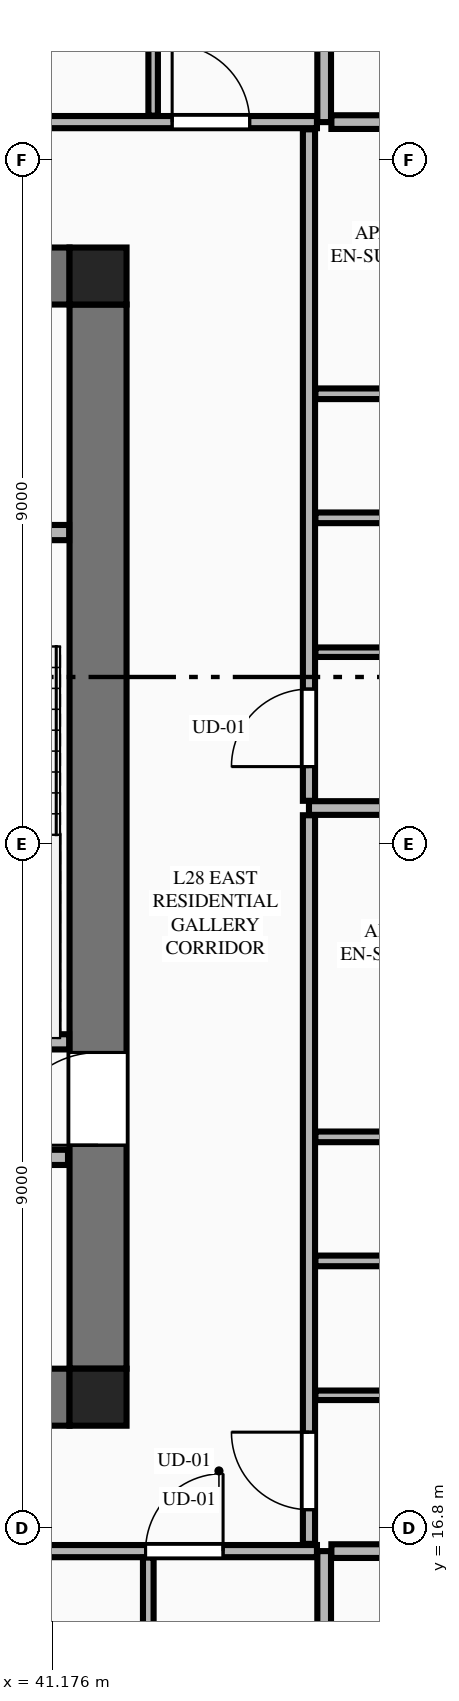
"""IFC4 building model, lengths in metres.
Left out: names, types, materials, properties, quantities, classifications, styles, units other than length and angle.
Written with IfcOpenShell. Run it as: python <this file> out.ifc"""

import sys

from ifc_helpers import new_model, si_unit, direction, frame, frame_2d, origin, origin_2d, place, context, subcontext, project, spatial, rectangle, extrude, element, fill, save


model = new_model("IFC4")
c1 = context("Model", 3, precision=1e-05, world=origin(), true_north=direction((0.0, 1.0)))
c2 = subcontext(c1, "Body", "Model", "MODEL_VIEW")
j1 = project(units=[si_unit("LENGTHUNIT", "METRE"), si_unit("PLANEANGLEUNIT", "RADIAN")], contexts=[c1])
p1 = place(None, origin())
s1 = spatial("IfcSite", under=j1, at=p1, CompositionType="ELEMENT")
p2 = place(p1, origin())
s2 = spatial("IfcBuilding", under=s1, at=p2, CompositionType="ELEMENT")
p3 = place(p2, frame((0.0, 0.0, 109.05)))
s3 = spatial("IfcBuildingStorey", under=s2, at=p3, CompositionType="ELEMENT", Elevation=109.05)
for number, where, z_axis, x_axis in (
    (1, (41.775, 18.525, 0.0), (0.0, 0.0, 1.0), (1.0, 0.0, 0.0)),
    (2, (41.775, 33.275, 0.0), (0.0, 0.0, 1.0), (1.0, 0.0, 0.0)),
):
    element("IfcColumn", number, at=place(p3, frame(where, z_axis=z_axis, x_axis=x_axis)), inside=s3, PredefinedType="COLUMN", context=c2, shape_type="SweptSolid", body=[
        extrude(rectangle(XDim=0.75, YDim=0.75, at=origin_2d()), origin(), (0.0, 0.0, 1.0), 3.55),
    ])
for number, where, z_axis, x_axis in (
    (3, (23.4, 18.525, 0.0), (0.0, 0.0, 1.0), (1.0, 0.0, 0.0)),
    (4, (23.4, 33.275, 0.0), (0.0, 0.0, 1.0), (1.0, 0.0, 0.0)),
):
    element("IfcWall", number, at=place(p3, frame(where, z_axis=z_axis, x_axis=x_axis)), inside=s3, PredefinedType="SHEAR", context=c2, shape_type="SweptSolid", body=[
        extrude(rectangle(XDim=18.0, YDim=0.75, at=frame_2d((9.0, 0.0))), origin(), (0.0, 0.0, 1.0), 3.34),
    ])
p4 = place(p3, frame((41.775, 18.9, 0.0), z_axis=(0.0, 0.0, 1.0), x_axis=(0.0, 1.0, 0.0)))
e5 = element("IfcWall", 5, at=p4, inside=s3, PredefinedType="SHEAR", context=c2, shape_type="SweptSolid", body=[
    extrude(rectangle(XDim=14.0, YDim=0.75, at=frame_2d((7.0, 0.0))), origin(), (0.0, 0.0, 1.0), 3.34),
])
p5 = place(p4, frame((2.94, 0.0, 0.0)))
e6 = element("IfcOpeningElement", 6, at=p5, cuts=e5, PredefinedType="OPENING", context=c2, shape_type="SweptSolid", body=[
    extrude(rectangle(XDim=1.22, YDim=2.25, at=frame_2d((0.61, 1.125))), frame((0.0, 0.385, 0.0), z_axis=(0.0, -1.0, 0.0), x_axis=(1.0, 0.0, 0.0)), (0.0, 0.0, 1.0), 0.77),
])
p6 = place(p3, frame((38.125, 23.2, 0.0), z_axis=(0.0, 0.0, 1.0), x_axis=(1.0, 0.0, 0.0)))
e7 = element("IfcWall", 7, at=p6, inside=s3, PredefinedType="PLUMBINGWALL", context=c2, shape_type="SweptSolid", body=[
    extrude(rectangle(XDim=3.27, YDim=0.2, at=frame_2d((1.635, 0.0))), origin(), (0.0, 0.0, 1.0), 3.34),
])
p7 = place(p3, frame((38.125, 29.9, 0.0), z_axis=(0.0, 0.0, 1.0), x_axis=(1.0, 0.0, 0.0)))
e8 = element("IfcWall", 8, at=p7, inside=s3, PredefinedType="PLUMBINGWALL", context=c2, shape_type="SweptSolid", body=[
    extrude(rectangle(XDim=3.27, YDim=0.2, at=frame_2d((1.635, 0.0))), origin(), (0.0, 0.0, 1.0), 3.34),
])
p8 = place(p7, frame((0.5, 0.0, 0.0)))
e9 = element("IfcOpeningElement", 9, at=p8, cuts=e8, PredefinedType="OPENING", context=c2, shape_type="SweptSolid", body=[
    extrude(rectangle(XDim=0.85, YDim=2.05, at=frame_2d((0.425, 1.025))), frame((0.0, 0.11, 0.0), z_axis=(0.0, -1.0, 0.0), x_axis=(1.0, 0.0, 0.0)), (0.0, 0.0, 1.0), 0.22),
])
p9 = place(p3, frame((23.42, 21.68, 0.0), z_axis=(0.0, 0.0, 1.0), x_axis=(1.0, 0.0, 0.0)))
e10 = element("IfcWall", 10, at=p9, inside=s3, PredefinedType="PLUMBINGWALL", context=c2, shape_type="SweptSolid", body=[
    extrude(rectangle(XDim=17.96, YDim=0.2, at=frame_2d((8.98, 0.0))), origin(), (0.0, 0.0, 1.0), 3.34),
])
p10 = place(p9, frame((11.6, 0.0, 0.0)))
e11 = element("IfcOpeningElement", 11, at=p10, cuts=e10, PredefinedType="OPENING", context=c2, shape_type="SweptSolid", body=[
    extrude(rectangle(XDim=1.1, YDim=2.2, at=frame_2d((0.55, 1.1))), frame((0.0, 0.11, 0.0), z_axis=(0.0, -1.0, 0.0), x_axis=(1.0, 0.0, 0.0)), (0.0, 0.0, 1.0), 0.22),
])
p11 = place(p9, frame((0.41, 0.0, 0.0)))
e12 = element("IfcOpeningElement", 12, at=p11, cuts=e10, PredefinedType="OPENING", context=c2, shape_type="SweptSolid", body=[
    extrude(rectangle(XDim=0.85, YDim=2.05, at=frame_2d((0.425, 1.025))), frame((0.0, 0.11, 0.0), z_axis=(0.0, -1.0, 0.0), x_axis=(1.0, 0.0, 0.0)), (0.0, 0.0, 1.0), 0.22),
])
p12 = place(p9, frame((4.13, 0.0, 0.0)))
e13 = element("IfcOpeningElement", 13, at=p12, cuts=e10, PredefinedType="OPENING", context=c2, shape_type="SweptSolid", body=[
    extrude(rectangle(XDim=0.85, YDim=2.05, at=frame_2d((0.425, 1.025))), frame((0.0, 0.11, 0.0), z_axis=(0.0, -1.0, 0.0), x_axis=(1.0, 0.0, 0.0)), (0.0, 0.0, 1.0), 0.22),
])
p13 = place(p9, frame((7.83, 0.0, 0.0)))
e14 = element("IfcOpeningElement", 14, at=p13, cuts=e10, PredefinedType="OPENING", context=c2, shape_type="SweptSolid", body=[
    extrude(rectangle(XDim=0.85, YDim=2.05, at=frame_2d((0.425, 1.025))), frame((0.0, 0.11, 0.0), z_axis=(0.0, -1.0, 0.0), x_axis=(1.0, 0.0, 0.0)), (0.0, 0.0, 1.0), 0.22),
])
p14 = place(p9, frame((13.78, 0.0, 0.0)))
e15 = element("IfcOpeningElement", 15, at=p14, cuts=e10, PredefinedType="OPENING", context=c2, shape_type="SweptSolid", body=[
    extrude(rectangle(XDim=0.85, YDim=2.05, at=frame_2d((0.425, 1.025))), frame((0.0, 0.11, 0.0), z_axis=(0.0, -1.0, 0.0), x_axis=(1.0, 0.0, 0.0)), (0.0, 0.0, 1.0), 0.22),
])
p15 = place(p9, frame((16.13, 0.0, 0.0)))
e16 = element("IfcOpeningElement", 16, at=p15, cuts=e10, PredefinedType="OPENING", context=c2, shape_type="SweptSolid", body=[
    extrude(rectangle(XDim=0.85, YDim=2.05, at=frame_2d((0.425, 1.025))), frame((0.0, 0.11, 0.0), z_axis=(0.0, -1.0, 0.0), x_axis=(1.0, 0.0, 0.0)), (0.0, 0.0, 1.0), 0.22),
])
p16 = place(p3, frame((44.75, 4.105, 0.0), z_axis=(0.0, 0.0, 1.0), x_axis=(0.0, 1.0, 0.0)))
e17 = element("IfcWall", 17, at=p16, inside=s3, PredefinedType="PARTITIONING", context=c2, shape_type="SweptSolid", body=[
    extrude(rectangle(XDim=12.395, YDim=0.18, at=frame_2d((6.198, 0.0))), origin(), (0.0, 0.0, 1.0), 3.34),
])
p17 = place(p3, frame((36.327, 16.5, 0.0), z_axis=(0.0, 0.0, 1.0), x_axis=(1.0, 0.0, 0.0)))
e18 = element("IfcWall", 18, at=p17, inside=s3, PredefinedType="PARTITIONING", context=c2, shape_type="SweptSolid", body=[
    extrude(rectangle(XDim=8.328, YDim=0.16, at=frame_2d((4.164, 0.0))), origin(), (0.0, 0.0, 1.0), 3.34),
])
p18 = place(p17, frame((6.073, 0.0, 0.0)))
e19 = element("IfcOpeningElement", 19, at=p18, cuts=e18, PredefinedType="OPENING", context=c2, shape_type="SweptSolid", body=[
    extrude(rectangle(XDim=1.02, YDim=2.25, at=frame_2d((0.51, 1.125))), frame((0.0, 0.09, 0.0), z_axis=(0.0, -1.0, 0.0), x_axis=(1.0, 0.0, 0.0)), (0.0, 0.0, 1.0), 0.18),
])
p19 = place(p3, frame((42.436, 10.036, 0.0), z_axis=(0.0, 0.0, 1.0), x_axis=(0.0, 1.0, 0.0)))
e20 = element("IfcWall", 20, at=p19, inside=s3, PredefinedType="PLUMBINGWALL", context=c2, shape_type="SweptSolid", body=[
    extrude(rectangle(XDim=6.379, YDim=0.14, at=frame_2d((3.189, 0.0))), origin(), (0.0, 0.0, 1.0), 2.722),
])
p20 = place(p3, frame((44.75, 35.3, 0.0), z_axis=(0.0, 0.0, 1.0), x_axis=(0.0, 1.0, 0.0)))
e21 = element("IfcWall", 21, at=p20, inside=s3, PredefinedType="PARTITIONING", context=c2, shape_type="SweptSolid", body=[
    extrude(rectangle(XDim=12.195, YDim=0.18, at=frame_2d((6.098, 0.0))), origin(), (0.0, 0.0, 1.0), 3.34),
])
p21 = place(p3, frame((28.663, 35.3, 0.0), z_axis=(0.0, 0.0, 1.0), x_axis=(1.0, 0.0, 0.0)))
e22 = element("IfcWall", 22, at=p21, inside=s3, PredefinedType="PARTITIONING", context=c2, shape_type="SweptSolid", body=[
    extrude(rectangle(XDim=15.992, YDim=0.16, at=frame_2d((7.996, 0.0))), origin(), (0.0, 0.0, 1.0), 3.34),
])
p22 = place(p21, frame((14.087, 0.0, 0.0)))
e23 = element("IfcOpeningElement", 23, at=p22, cuts=e22, PredefinedType="OPENING", context=c2, shape_type="SweptSolid", body=[
    extrude(rectangle(XDim=1.02, YDim=2.25, at=frame_2d((0.51, 1.125))), frame((0.0, 0.09, 0.0), z_axis=(0.0, -1.0, 0.0), x_axis=(1.0, 0.0, 0.0)), (0.0, 0.0, 1.0), 0.18),
])
p23 = place(p3, frame((42.5, 35.385, 0.0), z_axis=(0.0, 0.0, 1.0), x_axis=(0.0, 1.0, 0.0)))
e24 = element("IfcWall", 24, at=p23, inside=s3, PredefinedType="PARTITIONING", context=c2, shape_type="SweptSolid", body=[
    extrude(rectangle(XDim=5.42, YDim=0.125, at=frame_2d((2.71, 0.0))), origin(), (0.0, 0.0, 1.0), 2.722),
])
p24 = place(p3, frame((44.845, 16.5, 0.0), z_axis=(0.0, 0.0, 1.0), x_axis=(1.0, 0.0, 0.0)))
e25 = element("IfcWall", 25, at=p24, inside=s3, PredefinedType="PARTITIONING", context=c2, shape_type="SweptSolid", body=[
    extrude(rectangle(XDim=7.77, YDim=0.18, at=frame_2d((3.885, 0.0))), origin(), (0.0, 0.0, 1.0), 3.34),
])
p25 = place(p3, frame((44.845, 35.3, 0.0), z_axis=(0.0, 0.0, 1.0), x_axis=(1.0, 0.0, 0.0)))
e26 = element("IfcWall", 26, at=p25, inside=s3, PredefinedType="PARTITIONING", context=c2, shape_type="SweptSolid", body=[
    extrude(rectangle(XDim=7.669, YDim=0.18, at=frame_2d((3.834, 0.0))), origin(), (0.0, 0.0, 1.0), 3.34),
])
p26 = place(p3, frame((44.55, 16.595, 0.0), z_axis=(0.0, 0.0, 1.0), x_axis=(0.0, 1.0, 0.0)))
e27 = element("IfcWall", 27, at=p26, inside=s3, PredefinedType="PARTITIONING", context=c2, shape_type="SweptSolid", body=[
    extrude(rectangle(XDim=9.586, YDim=0.16, at=frame_2d((4.793, 0.0))), origin(), (0.0, 0.0, 1.0), 3.34),
])
p27 = place(p26, frame((0.45, 0.0, 0.0)))
e28 = element("IfcOpeningElement", 28, at=p27, cuts=e27, PredefinedType="OPENING", context=c2, shape_type="SweptSolid", body=[
    extrude(rectangle(XDim=1.02, YDim=2.25, at=frame_2d((0.51, 1.125))), frame((0.0, 0.09, 0.0), z_axis=(0.0, -1.0, 0.0), x_axis=(1.0, 0.0, 0.0)), (0.0, 0.0, 1.0), 0.18),
])
p28 = place(p3, frame((44.635, 18.55, 0.0), z_axis=(0.0, 0.0, 1.0), x_axis=(1.0, 0.0, 0.0)))
e29 = element("IfcWall", 29, at=p28, inside=s3, PredefinedType="PARTITIONING", context=c2, shape_type="SweptSolid", body=[
    extrude(rectangle(XDim=3.38, YDim=0.125, at=frame_2d((1.69, 0.0))), origin(), (0.0, 0.0, 1.0), 2.722),
])
for number, where, z_axis, x_axis in (
    (30, (44.635, 21.95, 0.0), (0.0, 0.0, 1.0), (1.0, 0.0, 0.0)),
    (31, (44.635, 20.318, 0.0), (0.0, 0.0, 1.0), (1.0, 0.0, 0.0)),
):
    element("IfcWall", number, at=place(p3, frame(where, z_axis=z_axis, x_axis=x_axis)), inside=s3, PredefinedType="PLUMBINGWALL", context=c2, shape_type="SweptSolid", body=[
        extrude(rectangle(XDim=3.38, YDim=0.14, at=frame_2d((1.69, 0.0))), origin(), (0.0, 0.0, 1.0), 3.34),
    ])
p29 = place(p3, frame((44.55, 26.276, 0.0), z_axis=(0.0, 0.0, 1.0), x_axis=(1.0, 0.0, 0.0)))
e32 = element("IfcWall", 32, at=p29, inside=s3, PredefinedType="PARTITIONING", context=c2, shape_type="SweptSolid", body=[
    extrude(rectangle(XDim=12.308, YDim=0.18, at=frame_2d((6.154, 0.0))), origin(), (0.0, 0.0, 1.0), 3.34),
])
p30 = place(p3, frame((44.55, 26.371, 0.0), z_axis=(0.0, 0.0, 1.0), x_axis=(0.0, 1.0, 0.0)))
e33 = element("IfcWall", 33, at=p30, inside=s3, PredefinedType="PARTITIONING", context=c2, shape_type="SweptSolid", body=[
    extrude(rectangle(XDim=8.834, YDim=0.16, at=frame_2d((4.417, 0.0))), origin(), (0.0, 0.0, 1.0), 3.34),
])
p31 = place(p30, frame((0.45, 0.0, 0.0)))
e34 = element("IfcOpeningElement", 34, at=p31, cuts=e33, PredefinedType="OPENING", context=c2, shape_type="SweptSolid", body=[
    extrude(rectangle(XDim=1.02, YDim=2.25, at=frame_2d((0.51, 1.125))), frame((0.0, 0.09, 0.0), z_axis=(0.0, -1.0, 0.0), x_axis=(1.0, 0.0, 0.0)), (0.0, 0.0, 1.0), 0.18),
])
p32 = place(p3, frame((44.635, 28.326, 0.0), z_axis=(0.0, 0.0, 1.0), x_axis=(1.0, 0.0, 0.0)))
e35 = element("IfcWall", 35, at=p32, inside=s3, PredefinedType="PARTITIONING", context=c2, shape_type="SweptSolid", body=[
    extrude(rectangle(XDim=3.38, YDim=0.125, at=frame_2d((1.69, 0.0))), origin(), (0.0, 0.0, 1.0), 3.34),
])
for number, where, z_axis, x_axis in (
    (36, (44.635, 31.726, 0.0), (0.0, 0.0, 1.0), (1.0, 0.0, 0.0)),
    (37, (44.635, 30.094, 0.0), (0.0, 0.0, 1.0), (1.0, 0.0, 0.0)),
):
    element("IfcWall", number, at=place(p3, frame(where, z_axis=z_axis, x_axis=x_axis)), inside=s3, PredefinedType="PLUMBINGWALL", context=c2, shape_type="SweptSolid", body=[
        extrude(rectangle(XDim=3.38, YDim=0.14, at=frame_2d((1.69, 0.0))), origin(), (0.0, 0.0, 1.0), 3.34),
    ])
p33 = place(p5, origin())
e38 = element("IfcDoor", 38, at=p33, inside=s3, OperationType="SINGLE_SWING_LEFT", PredefinedType="DOOR", context=c2, shape_type="SweptSolid", body=[
    extrude(rectangle(XDim=1.22, YDim=2.25, at=frame_2d((0.61, 1.125))), frame((0.0, 0.025, 0.0), z_axis=(0.0, -1.0, 0.0), x_axis=(1.0, 0.0, 0.0)), (0.0, 0.0, 1.0), 0.05),
])
fill(e6, e38)
p34 = place(p18, origin())
e39 = element("IfcDoor", 39, at=p34, inside=s3, OperationType="SINGLE_SWING_RIGHT", PredefinedType="DOOR", context=c2, shape_type="SweptSolid", body=[
    extrude(rectangle(XDim=1.02, YDim=2.25, at=frame_2d((0.51, 1.125))), frame((0.0, 0.025, 0.0), z_axis=(0.0, -1.0, 0.0), x_axis=(1.0, 0.0, 0.0)), (0.0, 0.0, 1.0), 0.05),
])
fill(e19, e39)
p35 = place(p22, origin())
e40 = element("IfcDoor", 40, at=p35, inside=s3, OperationType="SINGLE_SWING_LEFT", PredefinedType="DOOR", context=c2, shape_type="SweptSolid", body=[
    extrude(rectangle(XDim=1.02, YDim=2.25, at=frame_2d((0.51, 1.125))), frame((0.0, 0.025, 0.0), z_axis=(0.0, -1.0, 0.0), x_axis=(1.0, 0.0, 0.0)), (0.0, 0.0, 1.0), 0.05),
])
fill(e23, e40)
p36 = place(p27, origin())
e41 = element("IfcDoor", 41, at=p36, inside=s3, OperationType="SINGLE_SWING_RIGHT", PredefinedType="DOOR", context=c2, shape_type="SweptSolid", body=[
    extrude(rectangle(XDim=1.02, YDim=2.25, at=frame_2d((0.51, 1.125))), frame((0.0, 0.025, 0.0), z_axis=(0.0, -1.0, 0.0), x_axis=(1.0, 0.0, 0.0)), (0.0, 0.0, 1.0), 0.05),
])
fill(e28, e41)
p37 = place(p31, origin())
e42 = element("IfcDoor", 42, at=p37, inside=s3, OperationType="SINGLE_SWING_LEFT", PredefinedType="DOOR", context=c2, shape_type="SweptSolid", body=[
    extrude(rectangle(XDim=1.02, YDim=2.25, at=frame_2d((0.51, 1.125))), frame((0.0, 0.025, 0.0), z_axis=(0.0, -1.0, 0.0), x_axis=(1.0, 0.0, 0.0)), (0.0, 0.0, 1.0), 0.05),
])
fill(e34, e42)
save(model, sys.argv[1])
